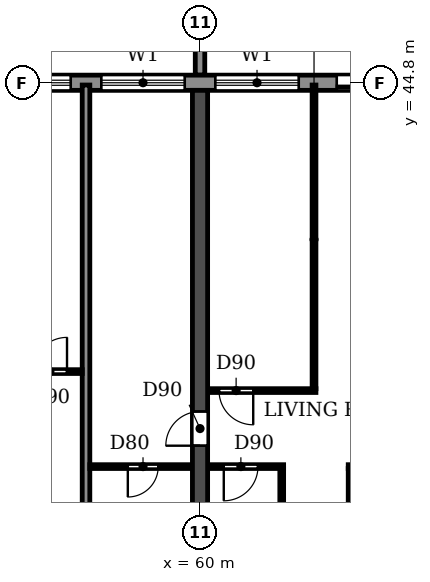
"""IFC4 building model, lengths in metres.
Left out: names, types, materials, properties, quantities, classifications, styles, units other than length and angle.
Written with IfcOpenShell. Run it as: python <this file> out.ifc"""

import sys

from ifc_helpers import new_model, si_unit, direction, frame, frame_2d, origin, place, context, subcontext, project, spatial, polyline, rectangle, outline, extrude, source, transform, mapped, element, fill, save


model = new_model("IFC4")
c1 = context("Model", 3, precision=1e-05, world=origin(), true_north=direction((0.0, 1.0)))
c2 = subcontext(c1, "Body", "Model", "MODEL_VIEW")
j1 = project(units=[si_unit("LENGTHUNIT", "METRE"), si_unit("PLANEANGLEUNIT", "RADIAN")], contexts=[c1])
p1 = place(None, origin())
s1 = spatial("IfcSite", under=j1, at=p1, CompositionType="ELEMENT")
p2 = place(p1, origin())
s2 = spatial("IfcBuilding", under=s1, at=p2, CompositionType="ELEMENT")
p3 = place(p2, frame((0.0, 0.0, 33.3)))
s3 = spatial("IfcBuildingStorey", under=s2, at=p3, CompositionType="ELEMENT", Elevation=33.3)
p4 = place(p3, frame((60.0, 30.55, 0.0), z_axis=(0.0, 0.0, 1.0), x_axis=(0.0, 1.0, 0.0)))
e1 = element("IfcWall", 1, at=p4, inside=s3, PredefinedType="SHEAR", context=c2, shape_type="SweptSolid", body=[
    extrude(rectangle(XDim=14.05, YDim=0.4, at=frame_2d((7.025, 0.0))), origin(), (0.0, 0.0, 1.0), 3.05),
])
p5 = place(p4, frame((4.7, 0.0, 0.0)))
e2 = element("IfcOpeningElement", 2, at=p5, cuts=e1, PredefinedType="OPENING", context=c2, shape_type="SweptSolid", body=[
    extrude(rectangle(XDim=0.9, YDim=2.1, at=frame_2d((0.45, 1.05))), frame((0.0, 0.21, 0.0), z_axis=(0.0, -1.0, 0.0), x_axis=(1.0, 0.0, 0.0)), (0.0, 0.0, 1.0), 0.42),
])
p6 = place(p3, frame((97.317, 44.8, 0.0), z_axis=(0.0, 0.0, 1.0), x_axis=(-1.0, 0.0, 0.0)))
e3 = element("IfcWall", 3, at=p6, inside=s3, PredefinedType="STANDARD", context=c2, shape_type="SweptSolid", body=[
    extrude(rectangle(XDim=92.634, YDim=0.4, at=frame_2d((46.317, 0.0))), origin(), (0.0, 0.0, 1.0), 3.05),
])
p7 = place(p6, frame((88.717, 0.0, 0.9)))
e4 = element("IfcOpeningElement", 4, at=p7, cuts=e3, PredefinedType="OPENING", context=c2, shape_type="SweptSolid", body=[
    extrude(rectangle(XDim=2.2, YDim=1.5, at=frame_2d((1.1, 0.75))), frame((0.0, 0.21, 0.0), z_axis=(0.0, -1.0, 0.0), x_axis=(1.0, 0.0, 0.0)), (0.0, 0.0, 1.0), 0.42),
])
p8 = place(p6, frame((85.917, 0.0, 0.0)))
e5 = element("IfcOpeningElement", 5, at=p8, cuts=e3, PredefinedType="OPENING", context=c2, shape_type="SweptSolid", body=[
    extrude(rectangle(XDim=1.8, YDim=2.4, at=frame_2d((0.9, 1.2))), frame((0.0, 0.21, 0.0), z_axis=(0.0, -1.0, 0.0), x_axis=(1.0, 0.0, 0.0)), (0.0, 0.0, 1.0), 0.42),
])
p9 = place(p6, frame((82.717, 0.0, 0.9)))
e6 = element("IfcOpeningElement", 6, at=p9, cuts=e3, PredefinedType="OPENING", context=c2, shape_type="SweptSolid", body=[
    extrude(rectangle(XDim=2.2, YDim=1.5, at=frame_2d((1.1, 0.75))), frame((0.0, 0.21, 0.0), z_axis=(0.0, -1.0, 0.0), x_axis=(1.0, 0.0, 0.0)), (0.0, 0.0, 1.0), 0.42),
])
p10 = place(p6, frame((79.917, 0.0, 0.0)))
e7 = element("IfcOpeningElement", 7, at=p10, cuts=e3, PredefinedType="OPENING", context=c2, shape_type="SweptSolid", body=[
    extrude(rectangle(XDim=1.8, YDim=2.4, at=frame_2d((0.9, 1.2))), frame((0.0, 0.21, 0.0), z_axis=(0.0, -1.0, 0.0), x_axis=(1.0, 0.0, 0.0)), (0.0, 0.0, 1.0), 0.42),
])
p11 = place(p6, frame((76.717, 0.0, 0.9)))
e8 = element("IfcOpeningElement", 8, at=p11, cuts=e3, PredefinedType="OPENING", context=c2, shape_type="SweptSolid", body=[
    extrude(rectangle(XDim=2.2, YDim=1.5, at=frame_2d((1.1, 0.75))), frame((0.0, 0.21, 0.0), z_axis=(0.0, -1.0, 0.0), x_axis=(1.0, 0.0, 0.0)), (0.0, 0.0, 1.0), 0.42),
])
p12 = place(p6, frame((73.717, 0.0, 0.9)))
e9 = element("IfcOpeningElement", 9, at=p12, cuts=e3, PredefinedType="OPENING", context=c2, shape_type="SweptSolid", body=[
    extrude(rectangle(XDim=2.2, YDim=1.5, at=frame_2d((1.1, 0.75))), frame((0.0, 0.21, 0.0), z_axis=(0.0, -1.0, 0.0), x_axis=(1.0, 0.0, 0.0)), (0.0, 0.0, 1.0), 0.42),
])
p13 = place(p6, frame((70.717, 0.0, 0.9)))
e10 = element("IfcOpeningElement", 10, at=p13, cuts=e3, PredefinedType="OPENING", context=c2, shape_type="SweptSolid", body=[
    extrude(rectangle(XDim=2.2, YDim=1.5, at=frame_2d((1.1, 0.75))), frame((0.0, 0.21, 0.0), z_axis=(0.0, -1.0, 0.0), x_axis=(1.0, 0.0, 0.0)), (0.0, 0.0, 1.0), 0.42),
])
p14 = place(p6, frame((67.917, 0.0, 0.0)))
e11 = element("IfcOpeningElement", 11, at=p14, cuts=e3, PredefinedType="OPENING", context=c2, shape_type="SweptSolid", body=[
    extrude(rectangle(XDim=1.8, YDim=2.4, at=frame_2d((0.9, 1.2))), frame((0.0, 0.21, 0.0), z_axis=(0.0, -1.0, 0.0), x_axis=(1.0, 0.0, 0.0)), (0.0, 0.0, 1.0), 0.42),
])
p15 = place(p6, frame((64.717, 0.0, 0.9)))
e12 = element("IfcOpeningElement", 12, at=p15, cuts=e3, PredefinedType="OPENING", context=c2, shape_type="SweptSolid", body=[
    extrude(rectangle(XDim=2.2, YDim=1.5, at=frame_2d((1.1, 0.75))), frame((0.0, 0.21, 0.0), z_axis=(0.0, -1.0, 0.0), x_axis=(1.0, 0.0, 0.0)), (0.0, 0.0, 1.0), 0.42),
])
p16 = place(p6, frame((61.717, 0.0, 0.9)))
e13 = element("IfcOpeningElement", 13, at=p16, cuts=e3, PredefinedType="OPENING", context=c2, shape_type="SweptSolid", body=[
    extrude(rectangle(XDim=2.2, YDim=1.5, at=frame_2d((1.1, 0.75))), frame((0.0, 0.21, 0.0), z_axis=(0.0, -1.0, 0.0), x_axis=(1.0, 0.0, 0.0)), (0.0, 0.0, 1.0), 0.42),
])
p17 = place(p6, frame((58.717, 0.0, 0.9)))
e14 = element("IfcOpeningElement", 14, at=p17, cuts=e3, PredefinedType="OPENING", context=c2, shape_type="SweptSolid", body=[
    extrude(rectangle(XDim=2.2, YDim=1.5, at=frame_2d((1.1, 0.75))), frame((0.0, 0.21, 0.0), z_axis=(0.0, -1.0, 0.0), x_axis=(1.0, 0.0, 0.0)), (0.0, 0.0, 1.0), 0.42),
])
p18 = place(p6, frame((55.917, 0.0, 0.0)))
e15 = element("IfcOpeningElement", 15, at=p18, cuts=e3, PredefinedType="OPENING", context=c2, shape_type="SweptSolid", body=[
    extrude(rectangle(XDim=1.8, YDim=2.4, at=frame_2d((0.9, 1.2))), frame((0.0, 0.21, 0.0), z_axis=(0.0, -1.0, 0.0), x_axis=(1.0, 0.0, 0.0)), (0.0, 0.0, 1.0), 0.42),
])
p19 = place(p6, frame((52.717, 0.0, 0.9)))
e16 = element("IfcOpeningElement", 16, at=p19, cuts=e3, PredefinedType="OPENING", context=c2, shape_type="SweptSolid", body=[
    extrude(rectangle(XDim=2.2, YDim=1.5, at=frame_2d((1.1, 0.75))), frame((0.0, 0.21, 0.0), z_axis=(0.0, -1.0, 0.0), x_axis=(1.0, 0.0, 0.0)), (0.0, 0.0, 1.0), 0.42),
])
p20 = place(p6, frame((49.717, 0.0, 0.9)))
e17 = element("IfcOpeningElement", 17, at=p20, cuts=e3, PredefinedType="OPENING", context=c2, shape_type="SweptSolid", body=[
    extrude(rectangle(XDim=2.2, YDim=1.5, at=frame_2d((1.1, 0.75))), frame((0.0, 0.21, 0.0), z_axis=(0.0, -1.0, 0.0), x_axis=(1.0, 0.0, 0.0)), (0.0, 0.0, 1.0), 0.42),
])
p21 = place(p6, frame((46.717, 0.0, 0.9)))
e18 = element("IfcOpeningElement", 18, at=p21, cuts=e3, PredefinedType="OPENING", context=c2, shape_type="SweptSolid", body=[
    extrude(rectangle(XDim=2.2, YDim=1.5, at=frame_2d((1.1, 0.75))), frame((0.0, 0.21, 0.0), z_axis=(0.0, -1.0, 0.0), x_axis=(1.0, 0.0, 0.0)), (0.0, 0.0, 1.0), 0.42),
])
p22 = place(p6, frame((43.917, 0.0, 0.0)))
e19 = element("IfcOpeningElement", 19, at=p22, cuts=e3, PredefinedType="OPENING", context=c2, shape_type="SweptSolid", body=[
    extrude(rectangle(XDim=1.8, YDim=2.4, at=frame_2d((0.9, 1.2))), frame((0.0, 0.21, 0.0), z_axis=(0.0, -1.0, 0.0), x_axis=(1.0, 0.0, 0.0)), (0.0, 0.0, 1.0), 0.42),
])
p23 = place(p6, frame((40.717, 0.0, 0.9)))
e20 = element("IfcOpeningElement", 20, at=p23, cuts=e3, PredefinedType="OPENING", context=c2, shape_type="SweptSolid", body=[
    extrude(rectangle(XDim=2.2, YDim=1.5, at=frame_2d((1.1, 0.75))), frame((0.0, 0.21, 0.0), z_axis=(0.0, -1.0, 0.0), x_axis=(1.0, 0.0, 0.0)), (0.0, 0.0, 1.0), 0.42),
])
p24 = place(p6, frame((37.717, 0.0, 0.9)))
e21 = element("IfcOpeningElement", 21, at=p24, cuts=e3, PredefinedType="OPENING", context=c2, shape_type="SweptSolid", body=[
    extrude(rectangle(XDim=2.2, YDim=1.5, at=frame_2d((1.1, 0.75))), frame((0.0, 0.21, 0.0), z_axis=(0.0, -1.0, 0.0), x_axis=(1.0, 0.0, 0.0)), (0.0, 0.0, 1.0), 0.42),
])
p25 = place(p6, frame((34.717, 0.0, 0.9)))
e22 = element("IfcOpeningElement", 22, at=p25, cuts=e3, PredefinedType="OPENING", context=c2, shape_type="SweptSolid", body=[
    extrude(rectangle(XDim=2.2, YDim=1.5, at=frame_2d((1.1, 0.75))), frame((0.0, 0.21, 0.0), z_axis=(0.0, -1.0, 0.0), x_axis=(1.0, 0.0, 0.0)), (0.0, 0.0, 1.0), 0.42),
])
p26 = place(p6, frame((31.917, 0.0, 0.0)))
e23 = element("IfcOpeningElement", 23, at=p26, cuts=e3, PredefinedType="OPENING", context=c2, shape_type="SweptSolid", body=[
    extrude(rectangle(XDim=1.8, YDim=2.4, at=frame_2d((0.9, 1.2))), frame((0.0, 0.21, 0.0), z_axis=(0.0, -1.0, 0.0), x_axis=(1.0, 0.0, 0.0)), (0.0, 0.0, 1.0), 0.42),
])
p27 = place(p6, frame((28.717, 0.0, 0.9)))
e24 = element("IfcOpeningElement", 24, at=p27, cuts=e3, PredefinedType="OPENING", context=c2, shape_type="SweptSolid", body=[
    extrude(rectangle(XDim=2.2, YDim=1.5, at=frame_2d((1.1, 0.75))), frame((0.0, 0.21, 0.0), z_axis=(0.0, -1.0, 0.0), x_axis=(1.0, 0.0, 0.0)), (0.0, 0.0, 1.0), 0.42),
])
p28 = place(p6, frame((25.717, 0.0, 0.9)))
e25 = element("IfcOpeningElement", 25, at=p28, cuts=e3, PredefinedType="OPENING", context=c2, shape_type="SweptSolid", body=[
    extrude(rectangle(XDim=2.2, YDim=1.5, at=frame_2d((1.1, 0.75))), frame((0.0, 0.21, 0.0), z_axis=(0.0, -1.0, 0.0), x_axis=(1.0, 0.0, 0.0)), (0.0, 0.0, 1.0), 0.42),
])
p29 = place(p6, frame((22.917, 0.0, 0.0)))
e26 = element("IfcOpeningElement", 26, at=p29, cuts=e3, PredefinedType="OPENING", context=c2, shape_type="SweptSolid", body=[
    extrude(rectangle(XDim=1.8, YDim=2.4, at=frame_2d((0.9, 1.2))), frame((0.0, 0.21, 0.0), z_axis=(0.0, -1.0, 0.0), x_axis=(1.0, 0.0, 0.0)), (0.0, 0.0, 1.0), 0.42),
])
p30 = place(p6, frame((19.717, 0.0, 0.9)))
e27 = element("IfcOpeningElement", 27, at=p30, cuts=e3, PredefinedType="OPENING", context=c2, shape_type="SweptSolid", body=[
    extrude(rectangle(XDim=2.2, YDim=1.5, at=frame_2d((1.1, 0.75))), frame((0.0, 0.21, 0.0), z_axis=(0.0, -1.0, 0.0), x_axis=(1.0, 0.0, 0.0)), (0.0, 0.0, 1.0), 0.42),
])
p31 = place(p6, frame((16.717, 0.0, 0.9)))
e28 = element("IfcOpeningElement", 28, at=p31, cuts=e3, PredefinedType="OPENING", context=c2, shape_type="SweptSolid", body=[
    extrude(rectangle(XDim=2.2, YDim=1.5, at=frame_2d((1.1, 0.75))), frame((0.0, 0.21, 0.0), z_axis=(0.0, -1.0, 0.0), x_axis=(1.0, 0.0, 0.0)), (0.0, 0.0, 1.0), 0.42),
])
p32 = place(p6, frame((13.917, 0.0, 0.0)))
e29 = element("IfcOpeningElement", 29, at=p32, cuts=e3, PredefinedType="OPENING", context=c2, shape_type="SweptSolid", body=[
    extrude(rectangle(XDim=1.8, YDim=2.4, at=frame_2d((0.9, 1.2))), frame((0.0, 0.21, 0.0), z_axis=(0.0, -1.0, 0.0), x_axis=(1.0, 0.0, 0.0)), (0.0, 0.0, 1.0), 0.42),
])
p33 = place(p6, frame((10.717, 0.0, 0.9)))
e30 = element("IfcOpeningElement", 30, at=p33, cuts=e3, PredefinedType="OPENING", context=c2, shape_type="SweptSolid", body=[
    extrude(rectangle(XDim=2.2, YDim=1.5, at=frame_2d((1.1, 0.75))), frame((0.0, 0.21, 0.0), z_axis=(0.0, -1.0, 0.0), x_axis=(1.0, 0.0, 0.0)), (0.0, 0.0, 1.0), 0.42),
])
p34 = place(p6, frame((7.917, 0.0, 0.0)))
e31 = element("IfcOpeningElement", 31, at=p34, cuts=e3, PredefinedType="OPENING", context=c2, shape_type="SweptSolid", body=[
    extrude(rectangle(XDim=1.8, YDim=2.4, at=frame_2d((0.9, 1.2))), frame((0.0, 0.21, 0.0), z_axis=(0.0, -1.0, 0.0), x_axis=(1.0, 0.0, 0.0)), (0.0, 0.0, 1.0), 0.42),
])
p35 = place(p6, frame((4.717, 0.0, 0.9)))
e32 = element("IfcOpeningElement", 32, at=p35, cuts=e3, PredefinedType="OPENING", context=c2, shape_type="SweptSolid", body=[
    extrude(rectangle(XDim=2.2, YDim=1.5, at=frame_2d((1.1, 0.75))), frame((0.0, 0.21, 0.0), z_axis=(0.0, -1.0, 0.0), x_axis=(1.0, 0.0, 0.0)), (0.0, 0.0, 1.0), 0.42),
])
p36 = place(p6, frame((1.917, 0.0, 0.0)))
e33 = element("IfcOpeningElement", 33, at=p36, cuts=e3, PredefinedType="OPENING", context=c2, shape_type="SweptSolid", body=[
    extrude(rectangle(XDim=1.8, YDim=2.4, at=frame_2d((0.9, 1.2))), frame((0.0, 0.21, 0.0), z_axis=(0.0, -1.0, 0.0), x_axis=(1.0, 0.0, 0.0)), (0.0, 0.0, 1.0), 0.42),
])
m1 = source(origin(), c2, "Body", "SweptSolid", [
    extrude(outline(polyline([(0.0, 0.0), (0.25, 0.0), (0.25, 3.1), (0.0, 3.1), (0.0, 0.0)])), origin(), (0.0, 0.0, 1.0), 3.1),
])
p37 = place(p3, frame((59.875, 45.0, 0.0)))
e34 = element("IfcWall", 34, at=p37, inside=s3, PredefinedType="STANDARD", context=c2, shape_type="MappedRepresentation", body=[
    mapped(m1, transform((0.0, 0.0, 0.0))),
])
p38 = place(p3, frame((57.0, 30.56, 0.0), z_axis=(0.0, 0.0, 1.0), x_axis=(0.0, 1.0, 0.0)))
e35 = element("IfcWall", 35, at=p38, inside=s3, PredefinedType="PARTITIONING", context=c2, shape_type="SweptSolid", body=[
    extrude(rectangle(XDim=14.18, YDim=0.2, at=frame_2d((7.09, 0.0))), origin(), (0.0, 0.0, 1.0), 3.05),
])
p39 = place(p3, frame((57.1, 34.7, 0.0), z_axis=(0.0, 0.0, 1.0), x_axis=(1.0, 0.0, 0.0)))
e36 = element("IfcWall", 36, at=p39, inside=s3, PredefinedType="PARTITIONING", context=c2, shape_type="SweptSolid", body=[
    extrude(rectangle(XDim=2.69, YDim=0.1, at=frame_2d((1.345, 0.0))), origin(), (0.0, 0.0, 1.0), 3.05),
])
p40 = place(p39, frame((1.0, 0.0, 0.0)))
e37 = element("IfcOpeningElement", 37, at=p40, cuts=e36, PredefinedType="OPENING", context=c2, shape_type="SweptSolid", body=[
    extrude(rectangle(XDim=0.8, YDim=2.1, at=frame_2d((0.4, 1.05))), frame((0.0, 0.06, 0.0), z_axis=(0.0, -1.0, 0.0), x_axis=(1.0, 0.0, 0.0)), (0.0, 0.0, 1.0), 0.12),
])
p41 = place(p3, frame((60.21, 34.7, 0.0), z_axis=(0.0, 0.0, 1.0), x_axis=(1.0, 0.0, 0.0)))
e38 = element("IfcWall", 38, at=p41, inside=s3, PredefinedType="PARTITIONING", context=c2, shape_type="SweptSolid", body=[
    extrude(rectangle(XDim=1.99, YDim=0.1, at=frame_2d((0.995, 0.0))), origin(), (0.0, 0.0, 1.0), 3.05),
])
p42 = place(p41, frame((0.415, 0.0, 0.0)))
e39 = element("IfcOpeningElement", 39, at=p42, cuts=e38, PredefinedType="OPENING", context=c2, shape_type="SweptSolid", body=[
    extrude(rectangle(XDim=0.9, YDim=2.1, at=frame_2d((0.45, 1.05))), frame((0.0, 0.06, 0.0), z_axis=(0.0, -1.0, 0.0), x_axis=(1.0, 0.0, 0.0)), (0.0, 0.0, 1.0), 0.12),
])
p43 = place(p3, frame((63.9, 34.7, 0.0), z_axis=(0.0, 0.0, 1.0), x_axis=(1.0, 0.0, 0.0)))
e40 = element("IfcWall", 40, at=p43, inside=s3, PredefinedType="PARTITIONING", context=c2, shape_type="SweptSolid", body=[
    extrude(rectangle(XDim=1.89, YDim=0.1, at=frame_2d((0.945, 0.0))), origin(), (0.0, 0.0, 1.0), 3.05),
])
p44 = place(p43, frame((0.675, 0.0, 0.0)))
e41 = element("IfcOpeningElement", 41, at=p44, cuts=e40, PredefinedType="OPENING", context=c2, shape_type="SweptSolid", body=[
    extrude(rectangle(XDim=0.8, YDim=2.1, at=frame_2d((0.4, 1.05))), frame((0.0, 0.06, 0.0), z_axis=(0.0, -1.0, 0.0), x_axis=(1.0, 0.0, 0.0)), (0.0, 0.0, 1.0), 0.12),
])
p45 = place(p3, frame((60.21, 36.7, 0.0), z_axis=(0.0, 0.0, 1.0), x_axis=(1.0, 0.0, 0.0)))
e42 = element("IfcWall", 42, at=p45, inside=s3, PredefinedType="PARTITIONING", context=c2, shape_type="SweptSolid", body=[
    extrude(rectangle(XDim=2.84, YDim=0.1, at=frame_2d((1.42, 0.0))), origin(), (0.0, 0.0, 1.0), 3.05),
])
p46 = place(p45, frame((0.29, 0.0, 0.0)))
e43 = element("IfcOpeningElement", 43, at=p46, cuts=e42, PredefinedType="OPENING", context=c2, shape_type="SweptSolid", body=[
    extrude(rectangle(XDim=0.9, YDim=2.1, at=frame_2d((0.45, 1.05))), frame((0.0, 0.06, 0.0), z_axis=(0.0, -1.0, 0.0), x_axis=(1.0, 0.0, 0.0)), (0.0, 0.0, 1.0), 0.12),
])
p47 = place(p3, frame((54.21, 37.2, 0.0), z_axis=(0.0, 0.0, 1.0), x_axis=(1.0, 0.0, 0.0)))
e44 = element("IfcWall", 44, at=p47, inside=s3, PredefinedType="PARTITIONING", context=c2, shape_type="SweptSolid", body=[
    extrude(rectangle(XDim=2.69, YDim=0.1, at=frame_2d((1.345, 0.0))), origin(), (0.0, 0.0, 1.0), 3.05),
])
p48 = place(p47, frame((1.39, 0.0, 0.0)))
e45 = element("IfcOpeningElement", 45, at=p48, cuts=e44, PredefinedType="OPENING", context=c2, shape_type="SweptSolid", body=[
    extrude(rectangle(XDim=0.9, YDim=2.1, at=frame_2d((0.45, 1.05))), frame((0.0, 0.06, 0.0), z_axis=(0.0, -1.0, 0.0), x_axis=(1.0, 0.0, 0.0)), (0.0, 0.0, 1.0), 0.12),
])
p49 = place(p3, frame((62.15, 30.56, 0.0), z_axis=(0.0, 0.0, 1.0), x_axis=(0.0, 1.0, 0.0)))
e46 = element("IfcWall", 46, at=p49, inside=s3, PredefinedType="PARTITIONING", context=c2, shape_type="SweptSolid", body=[
    extrude(rectangle(XDim=4.09, YDim=0.1, at=frame_2d((2.045, 0.0))), origin(), (0.0, 0.0, 1.0), 3.05),
])
p50 = place(p3, frame((63.0, 36.75, 0.0), z_axis=(0.0, 0.0, 1.0), x_axis=(0.0, 1.0, 0.0)))
e47 = element("IfcWall", 47, at=p50, inside=s3, PredefinedType="PARTITIONING", context=c2, shape_type="SweptSolid", body=[
    extrude(rectangle(XDim=7.99, YDim=0.1, at=frame_2d((3.995, 0.0))), origin(), (0.0, 0.0, 1.0), 3.05),
])
p51 = place(p3, frame((63.95, 30.56, 0.0), z_axis=(0.0, 0.0, 1.0), x_axis=(0.0, 1.0, 0.0)))
e48 = element("IfcWall", 48, at=p51, inside=s3, PredefinedType="PARTITIONING", context=c2, shape_type="SweptSolid", body=[
    extrude(rectangle(XDim=4.09, YDim=0.1, at=frame_2d((2.045, 0.0))), origin(), (0.0, 0.0, 1.0), 3.05),
])
p52 = place(p23, origin())
e49 = element("IfcWindow", 49, at=p52, inside=s3, PartitioningType="DOUBLE_PANEL_HORIZONTAL", PredefinedType="WINDOW", context=c2, shape_type="SweptSolid", body=[
    extrude(rectangle(XDim=2.2, YDim=1.5, at=frame_2d((1.1, 0.75))), frame((0.0, 0.03, 0.0), z_axis=(0.0, -1.0, 0.0), x_axis=(1.0, 0.0, 0.0)), (0.0, 0.0, 1.0), 0.06),
])
fill(e20, e49)
p53 = place(p24, origin())
e50 = element("IfcWindow", 50, at=p53, inside=s3, PartitioningType="DOUBLE_PANEL_HORIZONTAL", PredefinedType="WINDOW", context=c2, shape_type="SweptSolid", body=[
    extrude(rectangle(XDim=2.2, YDim=1.5, at=frame_2d((1.1, 0.75))), frame((0.0, 0.03, 0.0), z_axis=(0.0, -1.0, 0.0), x_axis=(1.0, 0.0, 0.0)), (0.0, 0.0, 1.0), 0.06),
])
fill(e21, e50)
p54 = place(p25, origin())
e51 = element("IfcWindow", 51, at=p54, inside=s3, PartitioningType="DOUBLE_PANEL_HORIZONTAL", PredefinedType="WINDOW", context=c2, shape_type="SweptSolid", body=[
    extrude(rectangle(XDim=2.2, YDim=1.5, at=frame_2d((1.1, 0.75))), frame((0.0, 0.03, 0.0), z_axis=(0.0, -1.0, 0.0), x_axis=(1.0, 0.0, 0.0)), (0.0, 0.0, 1.0), 0.06),
])
fill(e22, e51)
p55 = place(p26, origin())
e52 = element("IfcDoor", 52, at=p55, inside=s3, OperationType="DOUBLE_DOOR_SLIDING", PredefinedType="DOOR", context=c2, shape_type="SweptSolid", body=[
    extrude(rectangle(XDim=1.8, YDim=2.4, at=frame_2d((0.9, 1.2))), frame((0.0, 0.025, 0.0), z_axis=(0.0, -1.0, 0.0), x_axis=(1.0, 0.0, 0.0)), (0.0, 0.0, 1.0), 0.05),
])
fill(e23, e52)
p56 = place(p48, origin())
e53 = element("IfcDoor", 53, at=p56, inside=s3, OperationType="SINGLE_SWING_RIGHT", PredefinedType="DOOR", context=c2, shape_type="SweptSolid", body=[
    extrude(rectangle(XDim=0.9, YDim=2.1, at=frame_2d((0.45, 1.05))), frame((0.0, 0.025, 0.0), z_axis=(0.0, -1.0, 0.0), x_axis=(1.0, 0.0, 0.0)), (0.0, 0.0, 1.0), 0.05),
])
fill(e45, e53)
p57 = place(p40, frame((0.8, 0.0, 0.0), z_axis=(0.0, 0.0, 1.0), x_axis=(-1.0, 0.0, 0.0)))
e54 = element("IfcDoor", 54, at=p57, inside=s3, OperationType="SINGLE_SWING_RIGHT", PredefinedType="DOOR", context=c2, shape_type="SweptSolid", body=[
    extrude(rectangle(XDim=0.8, YDim=2.1, at=frame_2d((0.4, 1.05))), frame((0.0, 0.025, 0.0), z_axis=(0.0, -1.0, 0.0), x_axis=(1.0, 0.0, 0.0)), (0.0, 0.0, 1.0), 0.05),
])
fill(e37, e54)
p58 = place(p5, origin())
e55 = element("IfcDoor", 55, at=p58, inside=s3, OperationType="SINGLE_SWING_LEFT", PredefinedType="DOOR", context=c2, shape_type="SweptSolid", body=[
    extrude(rectangle(XDim=0.9, YDim=2.1, at=frame_2d((0.45, 1.05))), frame((0.0, 0.025, 0.0), z_axis=(0.0, -1.0, 0.0), x_axis=(1.0, 0.0, 0.0)), (0.0, 0.0, 1.0), 0.05),
])
fill(e2, e55)
p59 = place(p46, frame((0.9, 0.0, 0.0), z_axis=(0.0, 0.0, 1.0), x_axis=(-1.0, 0.0, 0.0)))
e56 = element("IfcDoor", 56, at=p59, inside=s3, OperationType="SINGLE_SWING_LEFT", PredefinedType="DOOR", context=c2, shape_type="SweptSolid", body=[
    extrude(rectangle(XDim=0.9, YDim=2.1, at=frame_2d((0.45, 1.05))), frame((0.0, 0.025, 0.0), z_axis=(0.0, -1.0, 0.0), x_axis=(1.0, 0.0, 0.0)), (0.0, 0.0, 1.0), 0.05),
])
fill(e43, e56)
p60 = place(p42, frame((0.9, 0.0, 0.0), z_axis=(0.0, 0.0, 1.0), x_axis=(-1.0, 0.0, 0.0)))
e57 = element("IfcDoor", 57, at=p60, inside=s3, OperationType="SINGLE_SWING_RIGHT", PredefinedType="DOOR", context=c2, shape_type="SweptSolid", body=[
    extrude(rectangle(XDim=0.9, YDim=2.1, at=frame_2d((0.45, 1.05))), frame((0.0, 0.025, 0.0), z_axis=(0.0, -1.0, 0.0), x_axis=(1.0, 0.0, 0.0)), (0.0, 0.0, 1.0), 0.05),
])
fill(e39, e57)
save(model, sys.argv[1])
